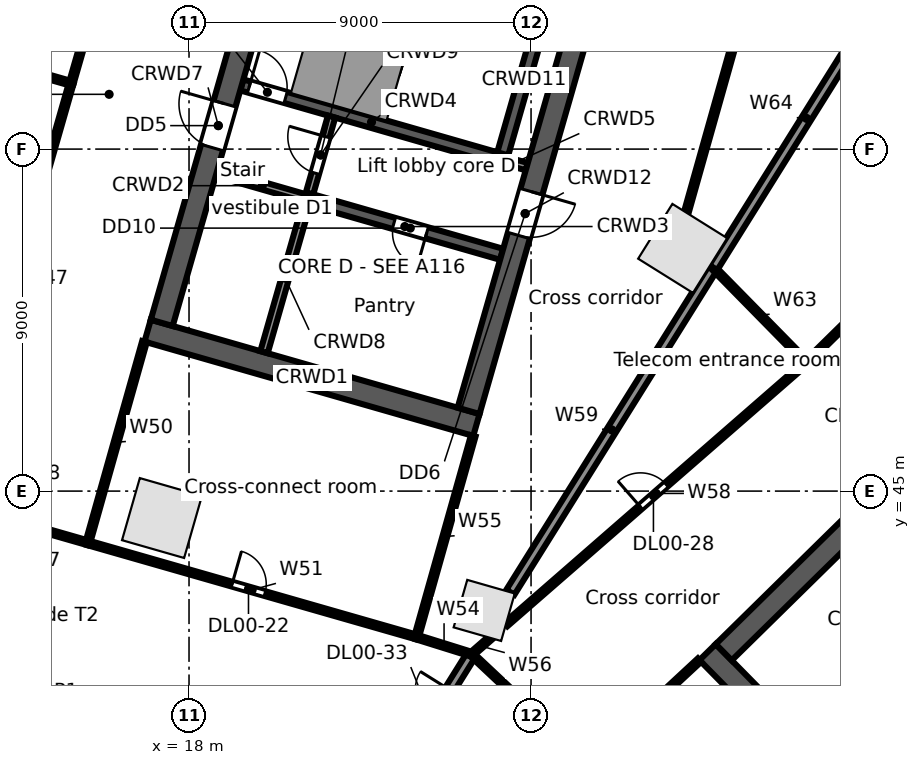
"""IFC4 building model, lengths in metres.
Left out: names, types, materials, properties, quantities, classifications, styles, units other than length and angle.
Written with IfcOpenShell. Run it as: python <this file> out.ifc"""

import sys

from ifc_helpers import new_model, si_unit, direction, frame, frame_2d, origin, origin_2d, place, context, subcontext, project, spatial, rectangle, extrude, element, fill, save


model = new_model("IFC4")
c1 = context("Model", 3, precision=1e-05, world=origin(), true_north=direction((0.0, 1.0)))
c2 = subcontext(c1, "Body", "Model", "MODEL_VIEW")
j1 = project(units=[si_unit("LENGTHUNIT", "METRE"), si_unit("PLANEANGLEUNIT", "RADIAN")], contexts=[c1])
p1 = place(None, origin())
s1 = spatial("IfcSite", under=j1, at=p1, CompositionType="ELEMENT")
p2 = place(p1, origin())
s2 = spatial("IfcBuilding", under=s1, at=p2, CompositionType="ELEMENT")
p3 = place(p2, origin())
s3 = spatial("IfcBuildingStorey", under=s2, at=p3, CompositionType="ELEMENT", Elevation=0.0)
p4 = place(p3, frame((17.288, 44.291, 0.0), z_axis=(0.0, 0.0, 1.0), x_axis=(0.961261695938, -0.275637355817, 0.0)))
e1 = element("IfcColumn", 1, at=p4, inside=s3, PredefinedType="COLUMN", context=c2, shape_type="SweptSolid", body=[
    extrude(rectangle(XDim=1.7, YDim=1.7, at=origin_2d()), origin(), (0.0, 0.0, 1.0), 6.5),
])
p5 = place(p3, frame((25.767, 41.86, 0.0), z_axis=(0.0, 0.0, 1.0), x_axis=(0.961261695938, -0.275637355817, 0.0)))
e2 = element("IfcColumn", 2, at=p5, inside=s3, PredefinedType="COLUMN", context=c2, shape_type="SweptSolid", body=[
    extrude(rectangle(XDim=1.3, YDim=1.3, at=origin_2d()), origin(), (0.0, 0.0, 1.0), 6.5),
])
p6 = place(p3, frame((30.99, 51.386, 0.0), z_axis=(0.0, 0.0, 1.0), x_axis=(0.529919264233, 0.848048096156, 0.0)))
e3 = element("IfcColumn", 3, at=p6, inside=s3, PredefinedType="COLUMN", context=c2, shape_type="SweptSolid", body=[
    extrude(rectangle(XDim=1.7, YDim=1.7, at=origin_2d()), origin(), (0.0, 0.0, 1.0), 6.5),
])
p7 = place(p3, frame((31.646, 40.763, 0.0), z_axis=(0.0, 0.0, 1.0), x_axis=(0.700911255944, -0.713248491965, 0.0)))
e4 = element("IfcWall", 4, at=p7, inside=s3, PredefinedType="SOLIDWALL", context=c2, shape_type="SweptSolid", body=[
    extrude(rectangle(XDim=15.0, YDim=0.6, at=frame_2d((7.5, 0.0))), origin(), (0.0, 0.0, 1.0), 6.15),
])
p8 = place(p7, frame((12.9, 0.0, 0.0)))
e5 = element("IfcOpeningElement", 5, at=p8, cuts=e4, PredefinedType="OPENING", context=c2, shape_type="SweptSolid", body=[
    extrude(rectangle(XDim=1.2, YDim=2.1, at=frame_2d((0.6, 1.05))), frame((0.0, 0.31, 0.0), z_axis=(0.0, -1.0, 0.0), x_axis=(1.0, 0.0, 0.0)), (0.0, 0.0, 1.0), 0.62),
])
p9 = place(p3, frame((32.07, 40.759, 0.0), z_axis=(0.0, 0.0, 1.0), x_axis=(0.713245344712, 0.70091445858, 0.0)))
e6 = element("IfcWall", 6, at=p9, inside=s3, PredefinedType="SOLIDWALL", context=c2, shape_type="SweptSolid", body=[
    extrude(rectangle(XDim=13.8, YDim=0.6, at=frame_2d((6.9, 0.0))), origin(), (0.0, 0.0, 1.0), 6.15),
])
p10 = place(p9, frame((6.3, 0.0, 0.0)))
e7 = element("IfcOpeningElement", 7, at=p10, cuts=e6, PredefinedType="OPENING", context=c2, shape_type="SweptSolid", body=[
    extrude(rectangle(XDim=1.2, YDim=2.1, at=frame_2d((0.6, 1.05))), frame((0.0, 0.31, 0.0), z_axis=(0.0, -1.0, 0.0), x_axis=(1.0, 0.0, 0.0)), (0.0, 0.0, 1.0), 0.62),
])
p11 = place(p3, frame((34.593, 38.191, 0.0), z_axis=(0.0, 0.0, 1.0), x_axis=(0.713252216116, 0.700907466222, 0.0)))
e8 = element("IfcWall", 8, at=p11, inside=s3, PredefinedType="SOLIDWALL", context=c2, shape_type="SweptSolid", body=[
    extrude(rectangle(XDim=4.45, YDim=0.2, at=frame_2d((2.225, 0.0))), origin(), (0.0, 0.0, 1.0), 6.15),
])
p12 = place(p3, frame((16.911, 49.221, 0.0), z_axis=(0.0, 0.0, 1.0), x_axis=(0.96126248289, -0.275634611374, 0.0)))
e9 = element("IfcWall", 9, at=p12, inside=s3, PredefinedType="SOLIDWALL", context=c2, shape_type="SweptSolid", body=[
    extrude(rectangle(XDim=9.0, YDim=0.6, at=frame_2d((4.5, 0.0))), origin(), (0.0, 0.0, 1.0), 6.15),
])
p13 = place(p3, frame((18.728, 53.382, 0.0), z_axis=(0.0, 0.0, 1.0), x_axis=(0.961247070632, -0.275688355216, 0.0)))
e10 = element("IfcWall", 10, at=p13, inside=s3, PredefinedType="SOLIDWALL", context=c2, shape_type="SweptSolid", body=[
    extrude(rectangle(XDim=2.5, YDim=0.2, at=frame_2d((1.25, 0.0))), origin(), (0.0, 0.0, 1.0), 6.15),
])
p14 = place(p3, frame((21.131, 52.692, 0.0), z_axis=(0.0, 0.0, 1.0), x_axis=(0.961271492568, -0.275603188616, 0.0)))
e11 = element("IfcWall", 11, at=p14, inside=s3, PredefinedType="SOLIDWALL", context=c2, shape_type="SweptSolid", body=[
    extrude(rectangle(XDim=5.3, YDim=0.3, at=frame_2d((2.65, 0.0))), origin(), (0.0, 0.0, 1.0), 6.15),
])
p15 = place(p14, frame((2.35, 0.0, 0.0)))
e12 = element("IfcOpeningElement", 12, at=p15, cuts=e11, PredefinedType="OPENING", context=c2, shape_type="SweptSolid", body=[
    extrude(rectangle(XDim=0.9, YDim=2.1, at=frame_2d((0.45, 1.05))), frame((0.0, 0.16, 0.0), z_axis=(0.0, -1.0, 0.0), x_axis=(1.0, 0.0, 0.0)), (0.0, 0.0, 1.0), 0.32),
])
p16 = place(p3, frame((19.389, 55.689, 0.0), z_axis=(0.0, 0.0, 1.0), x_axis=(0.961261397636, -0.275638396117, 0.0)))
e13 = element("IfcWall", 13, at=p16, inside=s3, PredefinedType="SOLIDWALL", context=c2, shape_type="SweptSolid", body=[
    extrude(rectangle(XDim=7.1, YDim=0.3, at=frame_2d((3.55, 0.0))), origin(), (0.0, 0.0, 1.0), 6.15),
])
p17 = place(p16, frame((0.2, 0.0, 0.0)))
e14 = element("IfcOpeningElement", 14, at=p17, cuts=e13, PredefinedType="OPENING", context=c2, shape_type="SweptSolid", body=[
    extrude(rectangle(XDim=1.0, YDim=2.1, at=frame_2d((0.5, 1.05))), frame((0.0, 0.16, 0.0), z_axis=(0.0, -1.0, 0.0), x_axis=(1.0, 0.0, 0.0)), (0.0, 0.0, 1.0), 0.32),
])
p18 = place(p3, frame((26.214, 53.732, 0.0), z_axis=(0.0, 0.0, 1.0), x_axis=(0.96122076476, -0.27578005982, 0.0)))
e15 = element("IfcWall", 15, at=p18, inside=s3, PredefinedType="SOLIDWALL", context=c2, shape_type="SweptSolid", body=[
    extrude(rectangle(XDim=0.7, YDim=0.2, at=frame_2d((0.35, 0.0))), origin(), (0.0, 0.0, 1.0), 6.15),
])
p19 = place(p3, frame((17.282, 49.427, 0.0), z_axis=(0.0, 0.0, 1.0), x_axis=(0.275631631629, 0.961263337304, 0.0)))
e16 = element("IfcWall", 16, at=p19, inside=s3, PredefinedType="SOLIDWALL", context=c2, shape_type="SweptSolid", body=[
    extrude(rectangle(XDim=10.8, YDim=0.6, at=frame_2d((5.4, 0.0))), origin(), (0.0, 0.0, 1.0), 6.15),
])
p20 = place(p19, frame((4.8, 0.0, 0.0)))
e17 = element("IfcOpeningElement", 17, at=p20, cuts=e16, PredefinedType="OPENING", context=c2, shape_type="SweptSolid", body=[
    extrude(rectangle(XDim=1.2, YDim=2.1, at=frame_2d((0.6, 1.05))), frame((0.0, 0.31, 0.0), z_axis=(0.0, -1.0, 0.0), x_axis=(1.0, 0.0, 0.0)), (0.0, 0.0, 1.0), 0.62),
])
p21 = place(p3, frame((19.973, 48.655, 0.0), z_axis=(0.0, 0.0, 1.0), x_axis=(0.275668441653, 0.961252781674, 0.0)))
e18 = element("IfcWall", 18, at=p21, inside=s3, PredefinedType="SOLIDWALL", context=c2, shape_type="SweptSolid", body=[
    extrude(rectangle(XDim=4.05, YDim=0.2, at=frame_2d((2.025, 0.0))), origin(), (0.0, 0.0, 1.0), 6.15),
])
p22 = place(p3, frame((21.172, 52.837, 0.0), z_axis=(0.0, 0.0, 1.0), x_axis=(0.275657676022, 0.961255868981, 0.0)))
e19 = element("IfcWall", 19, at=p22, inside=s3, PredefinedType="PARTITIONING", context=c2, shape_type="SweptSolid", body=[
    extrude(rectangle(XDim=2.1, YDim=0.2, at=frame_2d((1.05, 0.0))), origin(), (0.0, 0.0, 1.0), 6.15),
])
p23 = place(p22, frame((0.55, 0.0, 0.0)))
e20 = element("IfcOpeningElement", 20, at=p23, cuts=e19, PredefinedType="OPENING", context=c2, shape_type="SweptSolid", body=[
    extrude(rectangle(XDim=1.0, YDim=2.1, at=frame_2d((0.5, 1.05))), frame((0.0, 0.11, 0.0), z_axis=(0.0, -1.0, 0.0), x_axis=(1.0, 0.0, 0.0)), (0.0, 0.0, 1.0), 0.22),
])
p24 = place(p3, frame((26.256, 53.876, 0.0), z_axis=(0.0, 0.0, 1.0), x_axis=(0.275612739511, 0.961268754209, 0.0)))
e21 = element("IfcWall", 21, at=p24, inside=s3, PredefinedType="SOLIDWALL", context=c2, shape_type="SweptSolid", body=[
    extrude(rectangle(XDim=4.05, YDim=0.3, at=frame_2d((2.025, 0.0))), origin(), (0.0, 0.0, 1.0), 6.15),
])
p25 = place(p3, frame((25.356, 47.112, 0.0), z_axis=(0.0, 0.0, 1.0), x_axis=(0.275631631629, 0.961263337304, 0.0)))
e22 = element("IfcWall", 22, at=p25, inside=s3, PredefinedType="SOLIDWALL", context=c2, shape_type="SweptSolid", body=[
    extrude(rectangle(XDim=10.8, YDim=0.6, at=frame_2d((5.4, 0.0))), origin(), (0.0, 0.0, 1.0), 6.15),
])
p26 = place(p25, frame((4.8, 0.0, 0.0)))
e23 = element("IfcOpeningElement", 23, at=p26, cuts=e22, PredefinedType="OPENING", context=c2, shape_type="SweptSolid", body=[
    extrude(rectangle(XDim=1.2, YDim=2.1, at=frame_2d((0.6, 1.05))), frame((0.0, 0.31, 0.0), z_axis=(0.0, -1.0, 0.0), x_axis=(1.0, 0.0, 0.0)), (0.0, 0.0, 1.0), 0.62),
])
p27 = place(p3, frame((9.77, 57.199, 0.0), z_axis=(0.0, 0.0, 1.0), x_axis=(0.961262835898, -0.275633380273, 0.0)))
e24 = element("IfcWall", 24, at=p27, inside=s3, PredefinedType="PARTITIONING", context=c2, shape_type="SweptSolid", body=[
    extrude(rectangle(XDim=5.337, YDim=0.125, at=frame_2d((2.668, 0.0))), origin(), (0.0, 0.0, 1.0), 5.212),
])
p28 = place(p3, frame((11.73, 44.673, 0.0), z_axis=(0.0, 0.0, 1.0), x_axis=(0.275635044812, 0.961262358605, 0.0)))
e25 = element("IfcWall", 25, at=p28, inside=s3, PredefinedType="PARTITIONING", context=c2, shape_type="SweptSolid", body=[
    extrude(rectangle(XDim=11.5, YDim=0.125, at=frame_2d((5.75, 0.0))), origin(), (0.0, 0.0, 1.0), 5.212),
])
p29 = place(p3, frame((11.73, 44.673, 0.0), z_axis=(0.0, 0.0, 1.0), x_axis=(0.961228613303, -0.275752702557, 0.0)))
e26 = element("IfcWall", 26, at=p29, inside=s3, PredefinedType="PARTITIONING", context=c2, shape_type="SweptSolid", body=[
    extrude(rectangle(XDim=3.75, YDim=0.125, at=frame_2d((1.875, 0.0))), origin(), (0.0, 0.0, 1.0), 6.15),
])
p30 = place(p29, frame((1.45, 0.0, 0.0)))
e27 = element("IfcOpeningElement", 27, at=p30, cuts=e26, PredefinedType="OPENING", context=c2, shape_type="SweptSolid", body=[
    extrude(rectangle(XDim=0.9, YDim=2.1, at=frame_2d((0.45, 1.05))), frame((0.0, 0.073, 0.0), z_axis=(0.0, -1.0, 0.0), x_axis=(1.0, 0.0, 0.0)), (0.0, 0.0, 1.0), 0.145),
])
p31 = place(p3, frame((14.9, 55.728, 0.0), z_axis=(0.0, 0.0, 1.0), x_axis=(0.277168807321, 0.960821238446, 0.0)))
e28 = element("IfcWall", 28, at=p31, inside=s3, PredefinedType="PARTITIONING", context=c2, shape_type="SweptSolid", body=[
    extrude(rectangle(XDim=16.474, YDim=0.125, at=frame_2d((8.237, 0.0))), origin(), (0.0, 0.0, 1.0), 5.212),
])
p32 = place(p31, frame((7.45, 0.0, 0.0)))
e29 = element("IfcOpeningElement", 29, at=p32, cuts=e28, PredefinedType="OPENING", context=c2, shape_type="SweptSolid", body=[
    extrude(rectangle(XDim=1.8, YDim=2.1, at=frame_2d((0.9, 1.05))), frame((0.0, 0.073, 0.0), z_axis=(0.0, -1.0, 0.0), x_axis=(1.0, 0.0, 0.0)), (0.0, 0.0, 1.0), 0.145),
])
p33 = place(p3, frame((15.335, 43.639, 0.0), z_axis=(0.0, 0.0, 1.0), x_axis=(0.271407455373, 0.962464541252, 0.0)))
e30 = element("IfcWall", 30, at=p33, inside=s3, PredefinedType="PARTITIONING", context=c2, shape_type="SweptSolid", body=[
    extrude(rectangle(XDim=5.501, YDim=0.125, at=frame_2d((2.75, 0.0))), origin(), (0.0, 0.0, 1.0), 5.43),
])
p34 = place(p3, frame((15.335, 43.639, 0.0), z_axis=(0.0, 0.0, 1.0), x_axis=(0.961281982754, -0.275566597455, 0.0)))
e31 = element("IfcWall", 31, at=p34, inside=s3, PredefinedType="PARTITIONING", context=c2, shape_type="SweptSolid", body=[
    extrude(rectangle(XDim=9.0, YDim=0.125, at=frame_2d((4.5, 0.0))), origin(), (0.0, 0.0, 1.0), 5.322),
])
p35 = place(p34, frame((3.95, 0.0, 0.0)))
e32 = element("IfcOpeningElement", 32, at=p35, cuts=e31, PredefinedType="OPENING", context=c2, shape_type="SweptSolid", body=[
    extrude(rectangle(XDim=0.9, YDim=2.1, at=frame_2d((0.45, 1.05))), frame((0.0, 0.073, 0.0), z_axis=(0.0, -1.0, 0.0), x_axis=(1.0, 0.0, 0.0)), (0.0, 0.0, 1.0), 0.145),
])
p36 = place(p3, frame((23.397, 37.442, 0.0), z_axis=(0.0, 0.0, 1.0), x_axis=(0.529805058875, 0.848119448893, 0.0)))
e33 = element("IfcWall", 33, at=p36, inside=s3, PredefinedType="PARTITIONING", context=c2, shape_type="SweptSolid", body=[
    extrude(rectangle(XDim=3.849, YDim=0.25, at=frame_2d((1.924, 0.0))), origin(), (0.0, 0.0, 1.0), 5.212),
])
p37 = place(p36, frame((0.95, 0.0, 0.0)))
e34 = element("IfcOpeningElement", 34, at=p37, cuts=e33, PredefinedType="OPENING", context=c2, shape_type="SweptSolid", body=[
    extrude(rectangle(XDim=1.8, YDim=2.1, at=frame_2d((0.9, 1.05))), frame((0.0, 0.135, 0.0), z_axis=(0.0, -1.0, 0.0), x_axis=(1.0, 0.0, 0.0)), (0.0, 0.0, 1.0), 0.27),
])
p38 = place(p3, frame((23.986, 41.159, 0.0), z_axis=(0.0, 0.0, 1.0), x_axis=(0.954522865266, -0.298137719325, 0.0)))
e35 = element("IfcWall", 35, at=p38, inside=s3, PredefinedType="PARTITIONING", context=c2, shape_type="SweptSolid", body=[
    extrude(rectangle(XDim=1.519, YDim=0.125, at=frame_2d((0.76, 0.0))), origin(), (0.0, 0.0, 1.0), 5.212),
])
p39 = place(p3, frame((23.986, 41.159, 0.0), z_axis=(0.0, 0.0, 1.0), x_axis=(0.271465437068, 0.962448188983, 0.0)))
e36 = element("IfcWall", 36, at=p39, inside=s3, PredefinedType="PARTITIONING", context=c2, shape_type="SweptSolid", body=[
    extrude(rectangle(XDim=5.5, YDim=0.125, at=frame_2d((2.75, 0.0))), origin(), (0.0, 0.0, 1.0), 5.43),
])
p40 = place(p3, frame((25.436, 40.706, 0.0), z_axis=(0.0, 0.0, 1.0), x_axis=(0.753521944961, 0.657422754749, 0.0)))
e37 = element("IfcWall", 37, at=p40, inside=s3, PredefinedType="PARTITIONING", context=c2, shape_type="SweptSolid", body=[
    extrude(rectangle(XDim=0.656, YDim=0.125, at=frame_2d((0.328, 0.0))), origin(), (0.0, 0.0, 1.0), 6.15),
])
p41 = place(p3, frame((25.436, 40.706, 0.0), z_axis=(0.0, 0.0, 1.0), x_axis=(0.729011488135, -0.684501461041, 0.0)))
e38 = element("IfcWall", 38, at=p41, inside=s3, PredefinedType="PARTITIONING", context=c2, shape_type="SweptSolid", body=[
    extrude(rectangle(XDim=4.202, YDim=0.125, at=frame_2d((2.101, 0.0))), origin(), (0.0, 0.0, 1.0), 6.15),
])
p42 = place(p41, frame((1.7, 0.0, 0.0)))
e39 = element("IfcOpeningElement", 39, at=p42, cuts=e38, PredefinedType="OPENING", context=c2, shape_type="SweptSolid", body=[
    extrude(rectangle(XDim=0.9, YDim=2.1, at=frame_2d((0.45, 1.05))), frame((0.0, 0.073, 0.0), z_axis=(0.0, -1.0, 0.0), x_axis=(1.0, 0.0, 0.0)), (0.0, 0.0, 1.0), 0.145),
])
p43 = place(p3, frame((26.338, 41.492, 0.0), z_axis=(0.0, 0.0, 1.0), x_axis=(0.753866696092, 0.657027400131, 0.0)))
e40 = element("IfcWall", 40, at=p43, inside=s3, PredefinedType="PARTITIONING", context=c2, shape_type="SweptSolid", body=[
    extrude(rectangle(XDim=10.493, YDim=0.125, at=frame_2d((5.246, 0.0))), origin(), (0.0, 0.0, 1.0), 5.23),
])
p44 = place(p43, frame((4.7, 0.0, 0.0)))
e41 = element("IfcOpeningElement", 41, at=p44, cuts=e40, PredefinedType="OPENING", context=c2, shape_type="SweptSolid", body=[
    extrude(rectangle(XDim=0.9, YDim=2.1, at=frame_2d((0.45, 1.05))), frame((0.0, 0.073, 0.0), z_axis=(0.0, -1.0, 0.0), x_axis=(1.0, 0.0, 0.0)), (0.0, 0.0, 1.0), 0.145),
])
p45 = place(p3, frame((26.456, 42.338, 0.0), z_axis=(0.0, 0.0, 1.0), x_axis=(0.529866075757, 0.848081329686, 0.0)))
e42 = element("IfcWall", 42, at=p45, inside=s3, PredefinedType="PARTITIONING", context=c2, shape_type="SweptSolid", body=[
    extrude(rectangle(XDim=10.076, YDim=0.25, at=frame_2d((5.038, 0.0))), origin(), (0.0, 0.0, 1.0), 5.212),
])
p46 = place(p3, frame((28.499, 37.83, 0.0), z_axis=(0.0, 0.0, 1.0), x_axis=(0.732973836409, 0.680256830278, 0.0)))
e43 = element("IfcWall", 43, at=p46, inside=s3, PredefinedType="PARTITIONING", context=c2, shape_type="SweptSolid", body=[
    extrude(rectangle(XDim=4.001, YDim=0.125, at=frame_2d((2.0, 0.0))), origin(), (0.0, 0.0, 1.0), 5.43),
])
p47 = place(p3, frame((31.084, 52.329, 0.0), z_axis=(0.0, 0.0, 1.0), x_axis=(0.271372887947, 0.962474288325, 0.0)))
e44 = element("IfcWall", 44, at=p47, inside=s3, PredefinedType="PARTITIONING", context=c2, shape_type="SweptSolid", body=[
    extrude(rectangle(XDim=15.281, YDim=0.125, at=frame_2d((7.641, 0.0))), origin(), (0.0, 0.0, 1.0), 5.422),
])
p48 = place(p47, frame((7.2, 0.0, 0.0)))
e45 = element("IfcOpeningElement", 45, at=p48, cuts=e44, PredefinedType="OPENING", context=c2, shape_type="SweptSolid", body=[
    extrude(rectangle(XDim=0.9, YDim=2.1, at=frame_2d((0.45, 1.05))), frame((0.0, 0.073, 0.0), z_axis=(0.0, -1.0, 0.0), x_axis=(1.0, 0.0, 0.0)), (0.0, 0.0, 1.0), 0.145),
])
p49 = place(p3, frame((31.795, 50.883, 0.0), z_axis=(0.0, 0.0, 1.0), x_axis=(0.700801832867, -0.713356005828, 0.0)))
e46 = element("IfcWall", 46, at=p49, inside=s3, PredefinedType="PARTITIONING", context=c2, shape_type="SweptSolid", body=[
    extrude(rectangle(XDim=3.5, YDim=0.125, at=frame_2d((1.75, 0.0))), origin(), (0.0, 0.0, 1.0), 5.23),
])
p50 = place(p3, frame((31.795, 50.883, 0.0), z_axis=(0.0, 0.0, 1.0), x_axis=(0.530015532415, 0.847987933522, 0.0)))
e47 = element("IfcWall", 47, at=p50, inside=s3, PredefinedType="PARTITIONING", context=c2, shape_type="SweptSolid", body=[
    extrude(rectangle(XDim=9.258, YDim=0.25, at=frame_2d((4.629, 0.0))), origin(), (0.0, 0.0, 1.0), 5.23),
])
p51 = place(p3, frame((34.248, 48.386, 0.0), z_axis=(0.0, 0.0, 1.0), x_axis=(0.713246685355, 0.700913094349, 0.0)))
e48 = element("IfcWall", 48, at=p51, inside=s3, PredefinedType="PARTITIONING", context=c2, shape_type="SweptSolid", body=[
    extrude(rectangle(XDim=11.501, YDim=0.125, at=frame_2d((5.75, 0.0))), origin(), (0.0, 0.0, 1.0), 5.33),
])
p52 = place(p51, frame((5.2, 0.0, 0.0)))
e49 = element("IfcOpeningElement", 49, at=p52, cuts=e48, PredefinedType="OPENING", context=c2, shape_type="SweptSolid", body=[
    extrude(rectangle(XDim=0.9, YDim=2.1, at=frame_2d((0.45, 1.05))), frame((0.0, 0.073, 0.0), z_axis=(0.0, -1.0, 0.0), x_axis=(1.0, 0.0, 0.0)), (0.0, 0.0, 1.0), 0.145),
])
p53 = place(p17, origin())
e50 = element("IfcDoor", 50, at=p53, inside=s3, OperationType="SINGLE_SWING_LEFT", PredefinedType="DOOR", context=c2, shape_type="SweptSolid", body=[
    extrude(rectangle(XDim=1.0, YDim=2.1, at=frame_2d((0.5, 1.05))), frame((0.0, 0.025, 0.0), z_axis=(0.0, -1.0, 0.0), x_axis=(1.0, 0.0, 0.0)), (0.0, 0.0, 1.0), 0.05),
])
fill(e14, e50)
p54 = place(p23, origin())
e51 = element("IfcDoor", 51, at=p54, inside=s3, OperationType="SINGLE_SWING_RIGHT", PredefinedType="DOOR", context=c2, shape_type="SweptSolid", body=[
    extrude(rectangle(XDim=1.0, YDim=2.1, at=frame_2d((0.5, 1.05))), frame((0.0, 0.025, 0.0), z_axis=(0.0, -1.0, 0.0), x_axis=(1.0, 0.0, 0.0)), (0.0, 0.0, 1.0), 0.05),
])
fill(e20, e51)
p55 = place(p20, origin())
e52 = element("IfcDoor", 52, at=p55, inside=s3, OperationType="SINGLE_SWING_RIGHT", PredefinedType="DOOR", context=c2, shape_type="SweptSolid", body=[
    extrude(rectangle(XDim=1.2, YDim=2.1, at=frame_2d((0.6, 1.05))), frame((0.0, 0.025, 0.0), z_axis=(0.0, -1.0, 0.0), x_axis=(1.0, 0.0, 0.0)), (0.0, 0.0, 1.0), 0.05),
])
fill(e17, e52)
p56 = place(p26, frame((1.2, 0.0, 0.0), z_axis=(0.0, 0.0, 1.0), x_axis=(-1.0, 0.0, 0.0)))
e53 = element("IfcDoor", 53, at=p56, inside=s3, OperationType="SINGLE_SWING_LEFT", PredefinedType="DOOR", context=c2, shape_type="SweptSolid", body=[
    extrude(rectangle(XDim=1.2, YDim=2.1, at=frame_2d((0.6, 1.05))), frame((0.0, 0.025, 0.0), z_axis=(0.0, -1.0, 0.0), x_axis=(1.0, 0.0, 0.0)), (0.0, 0.0, 1.0), 0.05),
])
fill(e23, e53)
p57 = place(p15, frame((0.9, 0.0, 0.0), z_axis=(0.0, 0.0, 1.0), x_axis=(-1.0, 0.0, 0.0)))
e54 = element("IfcDoor", 54, at=p57, inside=s3, OperationType="SINGLE_SWING_LEFT", PredefinedType="DOOR", context=c2, shape_type="SweptSolid", body=[
    extrude(rectangle(XDim=0.9, YDim=2.1, at=frame_2d((0.45, 1.05))), frame((0.0, 0.025, 0.0), z_axis=(0.0, -1.0, 0.0), x_axis=(1.0, 0.0, 0.0)), (0.0, 0.0, 1.0), 0.05),
])
fill(e12, e54)
p58 = place(p35, origin())
e55 = element("IfcDoor", 55, at=p58, inside=s3, OperationType="SINGLE_SWING_LEFT", PredefinedType="DOOR", context=c2, shape_type="SweptSolid", body=[
    extrude(rectangle(XDim=0.9, YDim=2.1, at=frame_2d((0.45, 1.05))), frame((0.0, 0.025, 0.0), z_axis=(0.0, -1.0, 0.0), x_axis=(1.0, 0.0, 0.0)), (0.0, 0.0, 1.0), 0.05),
])
fill(e32, e55)
p59 = place(p44, origin())
e56 = element("IfcDoor", 56, at=p59, inside=s3, OperationType="SINGLE_SWING_LEFT", PredefinedType="DOOR", context=c2, shape_type="SweptSolid", body=[
    extrude(rectangle(XDim=0.9, YDim=2.1, at=frame_2d((0.45, 1.05))), frame((0.0, 0.025, 0.0), z_axis=(0.0, -1.0, 0.0), x_axis=(1.0, 0.0, 0.0)), (0.0, 0.0, 1.0), 0.05),
])
fill(e41, e56)
save(model, sys.argv[1])
